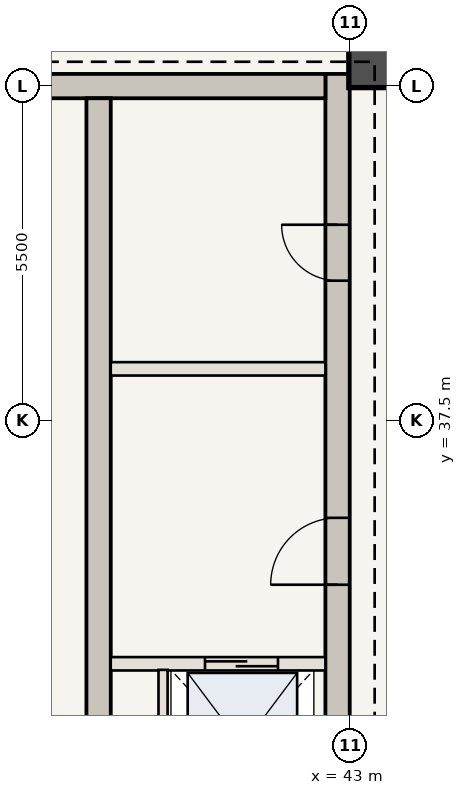
"""IFC4 building model, lengths in metres.
Left out: names, types, materials, properties, quantities, classifications, styles, units other than length and angle.
Written with IfcOpenShell. Run it as: python <this file> out.ifc"""

import sys

from ifc_helpers import new_model, si_unit, direction, frame, frame_2d, origin, origin_2d, place, context, subcontext, project, spatial, rectangle, extrude, element, fill, save


model = new_model("IFC4")
c1 = context("Model", 3, precision=1e-05, world=origin(), true_north=direction((0.0, 1.0)))
c2 = subcontext(c1, "Body", "Model", "MODEL_VIEW")
j1 = project(units=[si_unit("LENGTHUNIT", "METRE"), si_unit("PLANEANGLEUNIT", "RADIAN")], contexts=[c1])
p1 = place(None, origin())
s1 = spatial("IfcSite", under=j1, at=p1, CompositionType="ELEMENT")
p2 = place(p1, origin())
s2 = spatial("IfcBuilding", under=s1, at=p2, CompositionType="ELEMENT")
p3 = place(p2, frame((0.0, 0.0, 269.85)))
s3 = spatial("IfcBuildingStorey", under=s2, at=p3, CompositionType="ELEMENT", Elevation=269.85)
p4 = place(p3, frame((42.79, 30.6, 0.0), z_axis=(0.0, 0.0, 1.0), x_axis=(0.0, 1.0, 0.0)))
e1 = element("IfcWall", 1, at=p4, inside=s3, PredefinedType="SHEAR", context=c2, shape_type="SweptSolid", body=[
    extrude(rectangle(XDim=12.6, YDim=0.4, at=frame_2d((6.3, 0.0))), origin(), (0.0, 0.0, 1.0), 3.85),
])
p5 = place(p4, frame((4.2, 0.0, 0.0)))
e2 = element("IfcOpeningElement", 2, at=p5, cuts=e1, PredefinedType="OPENING", context=c2, shape_type="SweptSolid", body=[
    extrude(rectangle(XDim=1.1, YDim=2.15, at=frame_2d((0.55, 1.075))), frame((0.0, 0.21, 0.0), z_axis=(0.0, -1.0, 0.0), x_axis=(1.0, 0.0, 0.0)), (0.0, 0.0, 1.0), 0.42),
])
p6 = place(p4, frame((9.2, 0.0, 0.0)))
e3 = element("IfcOpeningElement", 3, at=p6, cuts=e1, PredefinedType="OPENING", context=c2, shape_type="SweptSolid", body=[
    extrude(rectangle(XDim=0.92, YDim=2.1, at=frame_2d((0.46, 1.05))), frame((0.0, 0.21, 0.0), z_axis=(0.0, -1.0, 0.0), x_axis=(1.0, 0.0, 0.0)), (0.0, 0.0, 1.0), 0.42),
])
p7 = place(p3, frame((37.75, 43.0, 0.0), z_axis=(0.0, 0.0, 1.0), x_axis=(1.0, 0.0, 0.0)))
e4 = element("IfcWall", 4, at=p7, inside=s3, PredefinedType="SHEAR", context=c2, shape_type="SweptSolid", body=[
    extrude(rectangle(XDim=4.84, YDim=0.4, at=frame_2d((2.42, 0.0))), origin(), (0.0, 0.0, 1.0), 3.85),
])
p8 = place(p3, frame((38.86, 30.6, 0.0), z_axis=(0.0, 0.0, 1.0), x_axis=(0.0, 1.0, 0.0)))
e5 = element("IfcWall", 5, at=p8, inside=s3, PredefinedType="SHEAR", context=c2, shape_type="SweptSolid", body=[
    extrude(rectangle(XDim=12.2, YDim=0.4, at=frame_2d((6.1, 0.0))), origin(), (0.0, 0.0, 1.0), 3.85),
])
p9 = place(p3, frame((43.35, 43.35, 0.0), z_axis=(0.0, 0.0, 1.0), x_axis=(1.0, 0.0, 0.0)))
e6 = element("IfcColumn", 6, at=p9, inside=s3, PredefinedType="COLUMN", context=c2, shape_type="SweptSolid", body=[
    extrude(rectangle(XDim=0.75, YDim=0.75, at=origin_2d()), origin(), (0.0, 0.0, 1.0), 3.85),
])
p10 = place(p3, frame((39.06, 33.5, 0.0), z_axis=(0.0, 0.0, 1.0), x_axis=(1.0, 0.0, 0.0)))
e7 = element("IfcWall", 7, at=p10, inside=s3, PredefinedType="STANDARD", context=c2, shape_type="SweptSolid", body=[
    extrude(rectangle(XDim=3.53, YDim=0.22, at=frame_2d((1.765, 0.0))), origin(), (0.0, 0.0, 1.0), 3.685),
])
p11 = place(p10, frame((1.55, 0.0, 0.0)))
e8 = element("IfcOpeningElement", 8, at=p11, cuts=e7, PredefinedType="OPENING", context=c2, shape_type="SweptSolid", body=[
    extrude(rectangle(XDim=1.2, YDim=2.2, at=frame_2d((0.6, 1.1))), frame((0.0, 0.12, 0.0), z_axis=(0.0, -1.0, 0.0), x_axis=(1.0, 0.0, 0.0)), (0.0, 0.0, 1.0), 0.24),
])
p12 = place(p3, frame((39.92, 30.75, 0.0), z_axis=(0.0, 0.0, 1.0), x_axis=(0.0, 1.0, 0.0)))
e9 = element("IfcWall", 9, at=p12, inside=s3, PredefinedType="STANDARD", context=c2, shape_type="SweptSolid", body=[
    extrude(rectangle(XDim=2.65, YDim=0.15, at=frame_2d((1.325, 0.0))), origin(), (0.0, 0.0, 1.0), 3.685),
])
p13 = place(p3, frame((39.06, 38.35, 0.0), z_axis=(0.0, 0.0, 1.0), x_axis=(1.0, 0.0, 0.0)))
e10 = element("IfcWall", 10, at=p13, inside=s3, PredefinedType="STANDARD", context=c2, shape_type="SweptSolid", body=[
    extrude(rectangle(XDim=3.53, YDim=0.22, at=frame_2d((1.765, 0.0))), origin(), (0.0, 0.0, 1.0), 3.685),
])
p14 = place(p5, origin())
e11 = element("IfcDoor", 11, at=p14, inside=s3, OperationType="SINGLE_SWING_LEFT", PredefinedType="DOOR", context=c2, shape_type="SweptSolid", body=[
    extrude(rectangle(XDim=1.1, YDim=2.15, at=frame_2d((0.55, 1.075))), frame((0.0, 0.025, 0.0), z_axis=(0.0, -1.0, 0.0), x_axis=(1.0, 0.0, 0.0)), (0.0, 0.0, 1.0), 0.05),
])
fill(e2, e11)
p15 = place(p6, origin())
e12 = element("IfcDoor", 12, at=p15, inside=s3, OperationType="SINGLE_SWING_RIGHT", PredefinedType="DOOR", context=c2, shape_type="SweptSolid", body=[
    extrude(rectangle(XDim=0.92, YDim=2.1, at=frame_2d((0.46, 1.05))), frame((0.0, 0.025, 0.0), z_axis=(0.0, -1.0, 0.0), x_axis=(1.0, 0.0, 0.0)), (0.0, 0.0, 1.0), 0.05),
])
fill(e3, e12)
p16 = place(p11, origin())
e13 = element("IfcDoor", 13, at=p16, inside=s3, OperationType="DOUBLE_DOOR_SLIDING", PredefinedType="DOOR", context=c2, shape_type="SweptSolid", body=[
    extrude(rectangle(XDim=1.2, YDim=2.2, at=frame_2d((0.6, 1.1))), frame((0.0, 0.025, 0.0), z_axis=(0.0, -1.0, 0.0), x_axis=(1.0, 0.0, 0.0)), (0.0, 0.0, 1.0), 0.05),
])
fill(e8, e13)
save(model, sys.argv[1])
